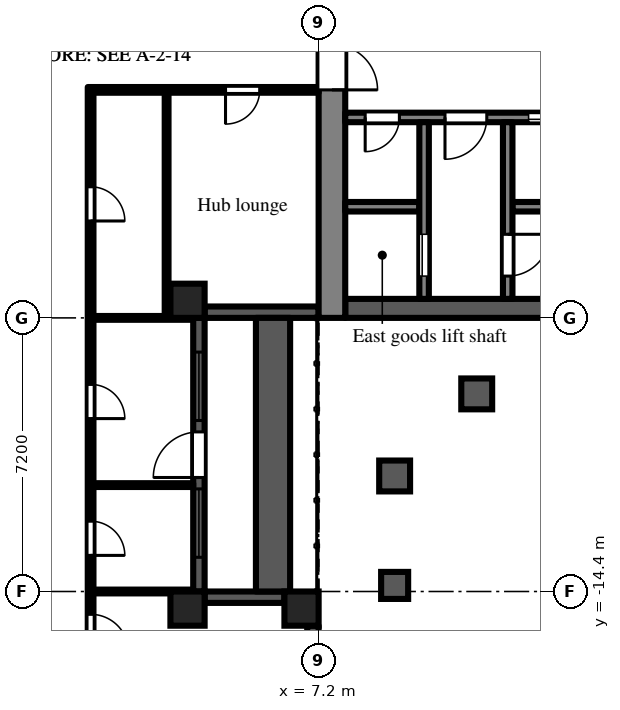
"""IFC4 building model, lengths in metres.
Left out: names, types, materials, properties, quantities, classifications, styles, units other than length and angle.
Written with IfcOpenShell. Run it as: python <this file> out.ifc"""

import sys

from ifc_helpers import new_model, si_unit, direction, frame, frame_2d, origin, origin_2d, place, context, subcontext, project, spatial, rectangle, extrude, element, fill, save


model = new_model("IFC4")
c1 = context("Model", 3, precision=1e-05, world=origin(), true_north=direction((0.0, 1.0)))
c2 = subcontext(c1, "Body", "Model", "MODEL_VIEW")
j1 = project(units=[si_unit("LENGTHUNIT", "METRE"), si_unit("PLANEANGLEUNIT", "RADIAN")], contexts=[c1])
p1 = place(None, origin())
s1 = spatial("IfcSite", under=j1, at=p1, CompositionType="ELEMENT")
p2 = place(p1, origin())
s2 = spatial("IfcBuilding", under=s1, at=p2, CompositionType="ELEMENT")
p3 = place(p2, frame((0.0, 0.0, 84.9)))
s3 = spatial("IfcBuildingStorey", under=s2, at=p3, CompositionType="ELEMENT", Elevation=84.9)
for number, where, z_axis, x_axis in (
    (1, (3.75, -14.85, 0.0), (0.0, 0.0, 1.0), (1.0, 0.0, 0.0)),
    (2, (3.75, -6.75, 0.0), (0.0, 0.0, 1.0), (1.0, 0.0, 0.0)),
    (3, (6.75, -14.85, 0.0), (0.0, 0.0, 1.0), (1.0, 0.0, 0.0)),
):
    element("IfcColumn", number, at=place(p3, frame(where, z_axis=z_axis, x_axis=x_axis)), inside=s3, PredefinedType="COLUMN", context=c2, shape_type="SweptSolid", body=[
        extrude(rectangle(XDim=0.9, YDim=0.9, at=origin_2d()), origin(), (0.0, 0.0, 1.0), 3.0),
    ])
p4 = place(p3, frame((7.05, -17.1, 0.0), z_axis=(0.0, 0.0, 1.0), x_axis=(0.0, 1.0, 0.0)))
e4 = element("IfcWall", 4, at=p4, inside=s3, PredefinedType="SOLIDWALL", context=c2, shape_type="SweptSolid", body=[
    extrude(rectangle(XDim=1.8, YDim=0.3, at=frame_2d((0.9, 0.0))), origin(), (0.0, 0.0, 1.0), 2.1),
])
p5 = place(p4, frame((0.3, 0.0, 0.2)))
e5 = element("IfcOpeningElement", 5, at=p5, cuts=e4, PredefinedType="OPENING", context=c2, shape_type="SweptSolid", body=[
    extrude(rectangle(XDim=1.2, YDim=1.85, at=frame_2d((0.6, 0.925))), frame((0.0, 0.16, 0.0), z_axis=(0.0, -1.0, 0.0), x_axis=(1.0, 0.0, 0.0)), (0.0, 0.0, 1.0), 0.32),
])
p6 = place(p3, frame((6.3, -14.55, 0.0), z_axis=(0.0, 0.0, 1.0), x_axis=(-1.0, 0.0, 0.0)))
e6 = element("IfcWall", 6, at=p6, inside=s3, PredefinedType="SOLIDWALL", context=c2, shape_type="SweptSolid", body=[
    extrude(rectangle(XDim=2.1, YDim=0.3, at=frame_2d((1.05, 0.0))), origin(), (0.0, 0.0, 1.0), 2.1),
])
p7 = place(p3, frame((4.05, -14.4, 0.0), z_axis=(0.0, 0.0, 1.0), x_axis=(0.0, 1.0, 0.0)))
e7 = element("IfcWall", 7, at=p7, inside=s3, PredefinedType="SOLIDWALL", context=c2, shape_type="SweptSolid", body=[
    extrude(rectangle(XDim=7.2, YDim=0.3, at=frame_2d((3.6, 0.0))), origin(), (0.0, 0.0, 1.0), 2.1),
])
p8 = place(p7, frame((3.0, 0.0, 0.0)))
e8 = element("IfcOpeningElement", 8, at=p8, cuts=e7, PredefinedType="OPENING", context=c2, shape_type="SweptSolid", body=[
    extrude(rectangle(XDim=1.2, YDim=2.05, at=frame_2d((0.6, 1.025))), frame((0.0, 0.16, 0.0), z_axis=(0.0, -1.0, 0.0), x_axis=(1.0, 0.0, 0.0)), (0.0, 0.0, 1.0), 0.32),
])
p9 = place(p7, frame((0.9, 0.0, 0.2)))
e9 = element("IfcOpeningElement", 9, at=p9, cuts=e7, PredefinedType="OPENING", context=c2, shape_type="SweptSolid", body=[
    extrude(rectangle(XDim=1.8, YDim=1.85, at=frame_2d((0.9, 0.925))), frame((0.0, 0.16, 0.0), z_axis=(0.0, -1.0, 0.0), x_axis=(1.0, 0.0, 0.0)), (0.0, 0.0, 1.0), 0.32),
])
p10 = place(p7, frame((4.5, 0.0, 0.2)))
e10 = element("IfcOpeningElement", 10, at=p10, cuts=e7, PredefinedType="OPENING", context=c2, shape_type="SweptSolid", body=[
    extrude(rectangle(XDim=1.8, YDim=1.85, at=frame_2d((0.9, 0.925))), frame((0.0, 0.16, 0.0), z_axis=(0.0, -1.0, 0.0), x_axis=(1.0, 0.0, 0.0)), (0.0, 0.0, 1.0), 0.32),
])
p11 = place(p3, frame((4.2, -7.05, 0.0), z_axis=(0.0, 0.0, 1.0), x_axis=(1.0, 0.0, 0.0)))
e11 = element("IfcWall", 11, at=p11, inside=s3, PredefinedType="SOLIDWALL", context=c2, shape_type="SweptSolid", body=[
    extrude(rectangle(XDim=3.0, YDim=0.3, at=frame_2d((1.5, 0.0))), origin(), (0.0, 0.0, 1.0), 2.1),
])
p12 = place(p3, frame((6.0, -14.4, 0.0), z_axis=(0.0, 0.0, 1.0), x_axis=(0.0, 1.0, 0.0)))
e12 = element("IfcWall", 12, at=p12, inside=s3, PredefinedType="PARAPET", context=c2, shape_type="SweptSolid", body=[
    extrude(rectangle(XDim=7.2, YDim=0.9, at=frame_2d((3.6, 0.0))), origin(), (0.0, 0.0, 1.0), 0.8),
])
p13 = place(p3, frame((7.55, -7.2, 0.0), z_axis=(0.0, 0.0, 1.0), x_axis=(0.0, 1.0, 0.0)))
e13 = element("IfcWall", 13, at=p13, inside=s3, PredefinedType="SHEAR", context=c2, shape_type="SweptSolid", body=[
    extrude(rectangle(XDim=14.4, YDim=0.7, at=frame_2d((7.2, 0.0))), origin(), (0.0, 0.0, 1.0), 2.575),
])
p14 = place(p13, frame((6.0, 0.0, 0.0)))
e14 = element("IfcOpeningElement", 14, at=p14, cuts=e13, PredefinedType="OPENING", context=c2, shape_type="SweptSolid", body=[
    extrude(rectangle(XDim=2.4, YDim=2.2, at=frame_2d((1.2, 1.1))), frame((0.0, 0.36, 0.0), z_axis=(0.0, -1.0, 0.0), x_axis=(1.0, 0.0, 0.0)), (0.0, 0.0, 1.0), 0.72),
])
p15 = place(p3, frame((7.9, -6.95, 0.0), z_axis=(0.0, 0.0, 1.0), x_axis=(1.0, 0.0, 0.0)))
e15 = element("IfcWall", 15, at=p15, inside=s3, PredefinedType="SHEAR", context=c2, shape_type="SweptSolid", body=[
    extrude(rectangle(XDim=12.95, YDim=0.5, at=frame_2d((6.475, 0.0))), origin(), (0.0, 0.0, 1.0), 2.575),
])
p16 = place(p3, frame((7.9, -1.925, 0.0), z_axis=(0.0, 0.0, 1.0), x_axis=(1.0, 0.0, 0.0)))
e16 = element("IfcWall", 16, at=p16, inside=s3, PredefinedType="SHEAR", context=c2, shape_type="SweptSolid", body=[
    extrude(rectangle(XDim=12.95, YDim=0.25, at=frame_2d((6.475, 0.0))), origin(), (0.0, 0.0, 1.0), 2.575),
])
p17 = place(p16, frame((4.825, 0.0, 0.0)))
e17 = element("IfcOpeningElement", 17, at=p17, cuts=e16, PredefinedType="OPENING", context=c2, shape_type="SweptSolid", body=[
    extrude(rectangle(XDim=1.1, YDim=2.1, at=frame_2d((0.55, 1.05))), frame((0.0, 0.135, 0.0), z_axis=(0.0, -1.0, 0.0), x_axis=(1.0, 0.0, 0.0)), (0.0, 0.0, 1.0), 0.27),
])
p18 = place(p16, frame((7.025, 0.0, 0.0)))
e18 = element("IfcOpeningElement", 18, at=p18, cuts=e16, PredefinedType="OPENING", context=c2, shape_type="SweptSolid", body=[
    extrude(rectangle(XDim=1.1, YDim=2.1, at=frame_2d((0.55, 1.05))), frame((0.0, 0.135, 0.0), z_axis=(0.0, -1.0, 0.0), x_axis=(1.0, 0.0, 0.0)), (0.0, 0.0, 1.0), 0.27),
])
p19 = place(p16, frame((9.225, 0.0, 0.0)))
e19 = element("IfcOpeningElement", 19, at=p19, cuts=e16, PredefinedType="OPENING", context=c2, shape_type="SweptSolid", body=[
    extrude(rectangle(XDim=1.1, YDim=2.1, at=frame_2d((0.55, 1.05))), frame((0.0, 0.135, 0.0), z_axis=(0.0, -1.0, 0.0), x_axis=(1.0, 0.0, 0.0)), (0.0, 0.0, 1.0), 0.27),
])
p20 = place(p16, frame((0.525, 0.0, 0.0)))
e20 = element("IfcOpeningElement", 20, at=p20, cuts=e16, PredefinedType="OPENING", context=c2, shape_type="SweptSolid", body=[
    extrude(rectangle(XDim=0.9, YDim=2.1, at=frame_2d((0.45, 1.05))), frame((0.0, 0.135, 0.0), z_axis=(0.0, -1.0, 0.0), x_axis=(1.0, 0.0, 0.0)), (0.0, 0.0, 1.0), 0.27),
])
p21 = place(p16, frame((2.625, 0.0, 0.0)))
e21 = element("IfcOpeningElement", 21, at=p21, cuts=e16, PredefinedType="OPENING", context=c2, shape_type="SweptSolid", body=[
    extrude(rectangle(XDim=1.1, YDim=2.1, at=frame_2d((0.55, 1.05))), frame((0.0, 0.135, 0.0), z_axis=(0.0, -1.0, 0.0), x_axis=(1.0, 0.0, 0.0)), (0.0, 0.0, 1.0), 0.27),
])
p22 = place(p3, frame((7.9, -4.275, 0.0), z_axis=(0.0, 0.0, 1.0), x_axis=(1.0, 0.0, 0.0)))
e22 = element("IfcWall", 22, at=p22, inside=s3, PredefinedType="SHEAR", context=c2, shape_type="SweptSolid", body=[
    extrude(rectangle(XDim=1.95, YDim=0.25, at=frame_2d((0.975, 0.0))), origin(), (0.0, 0.0, 1.0), 2.575),
])
p23 = place(p3, frame((12.3, -4.275, 0.0), z_axis=(0.0, 0.0, 1.0), x_axis=(1.0, 0.0, 0.0)))
e23 = element("IfcWall", 23, at=p23, inside=s3, PredefinedType="SHEAR", context=c2, shape_type="SweptSolid", body=[
    extrude(rectangle(XDim=8.55, YDim=0.25, at=frame_2d((4.275, 0.0))), origin(), (0.0, 0.0, 1.0), 2.575),
])
p24 = place(p3, frame((9.975, -2.05, 0.0), z_axis=(0.0, 0.0, 1.0), x_axis=(0.0, -1.0, 0.0)))
e24 = element("IfcWall", 24, at=p24, inside=s3, PredefinedType="SHEAR", context=c2, shape_type="SweptSolid", body=[
    extrude(rectangle(XDim=4.65, YDim=0.25, at=frame_2d((2.325, 0.0))), origin(), (0.0, 0.0, 1.0), 2.575),
])
p25 = place(p24, frame((2.95, 0.0, 0.0)))
e25 = element("IfcOpeningElement", 25, at=p25, cuts=e24, PredefinedType="OPENING", context=c2, shape_type="SweptSolid", body=[
    extrude(rectangle(XDim=1.1, YDim=2.1, at=frame_2d((0.55, 1.05))), frame((0.0, 0.135, 0.0), z_axis=(0.0, -1.0, 0.0), x_axis=(1.0, 0.0, 0.0)), (0.0, 0.0, 1.0), 0.27),
])
p26 = place(p3, frame((12.175, -2.05, 0.0), z_axis=(0.0, 0.0, 1.0), x_axis=(0.0, -1.0, 0.0)))
e26 = element("IfcWall", 26, at=p26, inside=s3, PredefinedType="SHEAR", context=c2, shape_type="SweptSolid", body=[
    extrude(rectangle(XDim=4.65, YDim=0.25, at=frame_2d((2.325, 0.0))), origin(), (0.0, 0.0, 1.0), 2.575),
])
p27 = place(p26, frame((2.95, 0.0, 0.0)))
e27 = element("IfcOpeningElement", 27, at=p27, cuts=e26, PredefinedType="OPENING", context=c2, shape_type="SweptSolid", body=[
    extrude(rectangle(XDim=1.1, YDim=2.1, at=frame_2d((0.55, 1.05))), frame((0.0, 0.135, 0.0), z_axis=(0.0, -1.0, 0.0), x_axis=(1.0, 0.0, 0.0)), (0.0, 0.0, 1.0), 0.27),
])
p28 = place(p3, frame((1.2, -36.5, 0.0), z_axis=(0.0, 0.0, 1.0), x_axis=(0.0, 1.0, 0.0)))
e28 = element("IfcWall", 28, at=p28, inside=s3, PredefinedType="PARTITIONING", context=c2, shape_type="SweptSolid", body=[
    extrude(rectangle(XDim=35.375, YDim=0.15, at=frame_2d((17.688, 0.0))), origin(), (0.0, 0.0, 1.0), 2.575),
])
p29 = place(p28, frame((31.85, 0.0, 0.0)))
e29 = element("IfcOpeningElement", 29, at=p29, cuts=e28, PredefinedType="OPENING", context=c2, shape_type="SweptSolid", body=[
    extrude(rectangle(XDim=0.9, YDim=2.1, at=frame_2d((0.45, 1.05))), frame((0.0, 0.085, 0.0), z_axis=(0.0, -1.0, 0.0), x_axis=(1.0, 0.0, 0.0)), (0.0, 0.0, 1.0), 0.17),
])
p30 = place(p28, frame((23.05, 0.0, 0.0)))
e30 = element("IfcOpeningElement", 30, at=p30, cuts=e28, PredefinedType="OPENING", context=c2, shape_type="SweptSolid", body=[
    extrude(rectangle(XDim=0.9, YDim=2.1, at=frame_2d((0.45, 1.05))), frame((0.0, 0.085, 0.0), z_axis=(0.0, -1.0, 0.0), x_axis=(1.0, 0.0, 0.0)), (0.0, 0.0, 1.0), 0.17),
])
p31 = place(p28, frame((26.65, 0.0, 0.0)))
e31 = element("IfcOpeningElement", 31, at=p31, cuts=e28, PredefinedType="OPENING", context=c2, shape_type="SweptSolid", body=[
    extrude(rectangle(XDim=0.9, YDim=2.1, at=frame_2d((0.45, 1.05))), frame((0.0, 0.085, 0.0), z_axis=(0.0, -1.0, 0.0), x_axis=(1.0, 0.0, 0.0)), (0.0, 0.0, 1.0), 0.17),
])
p32 = place(p28, frame((20.5, 0.0, 0.0)))
e32 = element("IfcOpeningElement", 32, at=p32, cuts=e28, PredefinedType="OPENING", context=c2, shape_type="SweptSolid", body=[
    extrude(rectangle(XDim=1.0, YDim=2.1, at=frame_2d((0.5, 1.05))), frame((0.0, 0.085, 0.0), z_axis=(0.0, -1.0, 0.0), x_axis=(1.0, 0.0, 0.0)), (0.0, 0.0, 1.0), 0.17),
])
p33 = place(p28, frame((1.55, 0.0, 0.0)))
e33 = element("IfcOpeningElement", 33, at=p33, cuts=e28, PredefinedType="OPENING", context=c2, shape_type="SweptSolid", body=[
    extrude(rectangle(XDim=1.0, YDim=2.1, at=frame_2d((0.5, 1.05))), frame((0.0, 0.085, 0.0), z_axis=(0.0, -1.0, 0.0), x_axis=(1.0, 0.0, 0.0)), (0.0, 0.0, 1.0), 0.17),
])
for number, where, z_axis, x_axis in (
    (34, (1.275, -14.4, 0.0), (0.0, 0.0, 1.0), (1.0, 0.0, 0.0)),
    (35, (1.275, -11.6, 0.0), (0.0, 0.0, 1.0), (1.0, 0.0, 0.0)),
    (36, (1.275, -7.2, 0.0), (0.0, 0.0, 1.0), (1.0, 0.0, 0.0)),
):
    element("IfcWall", number, at=place(p3, frame(where, z_axis=z_axis, x_axis=x_axis)), inside=s3, PredefinedType="PARTITIONING", context=c2, shape_type="SweptSolid", body=[
        extrude(rectangle(XDim=2.625, YDim=0.1, at=frame_2d((1.312, 0.0))), origin(), (0.0, 0.0, 1.0), 2.575),
    ])
p34 = place(p3, frame((1.275, -1.2, 0.0), z_axis=(0.0, 0.0, 1.0), x_axis=(1.0, 0.0, 0.0)))
e37 = element("IfcWall", 37, at=p34, inside=s3, PredefinedType="PARTITIONING", context=c2, shape_type="SweptSolid", body=[
    extrude(rectangle(XDim=5.925, YDim=0.15, at=frame_2d((2.962, 0.0))), origin(), (0.0, 0.0, 1.0), 2.575),
])
p35 = place(p34, frame((3.475, 0.0, 0.0)))
e38 = element("IfcOpeningElement", 38, at=p35, cuts=e37, PredefinedType="OPENING", context=c2, shape_type="SweptSolid", body=[
    extrude(rectangle(XDim=0.9, YDim=2.1, at=frame_2d((0.45, 1.05))), frame((0.0, 0.085, 0.0), z_axis=(0.0, -1.0, 0.0), x_axis=(1.0, 0.0, 0.0)), (0.0, 0.0, 1.0), 0.17),
])
p36 = place(p3, frame((3.2, -7.15, 0.0), z_axis=(0.0, 0.0, 1.0), x_axis=(0.0, 1.0, 0.0)))
e39 = element("IfcWall", 39, at=p36, inside=s3, PredefinedType="PARTITIONING", context=c2, shape_type="SweptSolid", body=[
    extrude(rectangle(XDim=5.875, YDim=0.1, at=frame_2d((2.938, 0.0))), origin(), (0.0, 0.0, 1.0), 2.575),
])
p37 = place(p8, origin())
e40 = element("IfcDoor", 40, at=p37, inside=s3, OperationType="SINGLE_SWING_LEFT", PredefinedType="DOOR", context=c2, shape_type="SweptSolid", body=[
    extrude(rectangle(XDim=1.2, YDim=2.05, at=frame_2d((0.6, 1.025))), frame((0.0, 0.025, 0.0), z_axis=(0.0, -1.0, 0.0), x_axis=(1.0, 0.0, 0.0)), (0.0, 0.0, 1.0), 0.05),
])
fill(e8, e40)
p38 = place(p9, origin())
e41 = element("IfcWindow", 41, at=p38, inside=s3, PartitioningType="SINGLE_PANEL", PredefinedType="WINDOW", context=c2, shape_type="SweptSolid", body=[
    extrude(rectangle(XDim=1.8, YDim=1.85, at=frame_2d((0.9, 0.925))), frame((0.0, 0.03, 0.0), z_axis=(0.0, -1.0, 0.0), x_axis=(1.0, 0.0, 0.0)), (0.0, 0.0, 1.0), 0.06),
])
fill(e9, e41)
p39 = place(p10, origin())
e42 = element("IfcWindow", 42, at=p39, inside=s3, PartitioningType="SINGLE_PANEL", PredefinedType="WINDOW", context=c2, shape_type="SweptSolid", body=[
    extrude(rectangle(XDim=1.8, YDim=1.85, at=frame_2d((0.9, 0.925))), frame((0.0, 0.03, 0.0), z_axis=(0.0, -1.0, 0.0), x_axis=(1.0, 0.0, 0.0)), (0.0, 0.0, 1.0), 0.06),
])
fill(e10, e42)
p40 = place(p17, origin())
e43 = element("IfcDoor", 43, at=p40, inside=s3, OperationType="SLIDING_TO_LEFT", PredefinedType="DOOR", context=c2, shape_type="SweptSolid", body=[
    extrude(rectangle(XDim=1.1, YDim=2.1, at=frame_2d((0.55, 1.05))), frame((0.0, 0.025, 0.0), z_axis=(0.0, -1.0, 0.0), x_axis=(1.0, 0.0, 0.0)), (0.0, 0.0, 1.0), 0.05),
])
fill(e17, e43)
p41 = place(p25, origin())
e44 = element("IfcDoor", 44, at=p41, inside=s3, OperationType="SLIDING_TO_LEFT", PredefinedType="DOOR", context=c2, shape_type="SweptSolid", body=[
    extrude(rectangle(XDim=1.1, YDim=2.1, at=frame_2d((0.55, 1.05))), frame((0.0, 0.025, 0.0), z_axis=(0.0, -1.0, 0.0), x_axis=(1.0, 0.0, 0.0)), (0.0, 0.0, 1.0), 0.05),
])
fill(e25, e44)
p42 = place(p27, origin())
e45 = element("IfcDoor", 45, at=p42, inside=s3, OperationType="SINGLE_SWING_LEFT", PredefinedType="DOOR", context=c2, shape_type="SweptSolid", body=[
    extrude(rectangle(XDim=1.1, YDim=2.1, at=frame_2d((0.55, 1.05))), frame((0.0, 0.025, 0.0), z_axis=(0.0, -1.0, 0.0), x_axis=(1.0, 0.0, 0.0)), (0.0, 0.0, 1.0), 0.05),
])
fill(e27, e45)
p43 = place(p20, frame((0.9, 0.0, 0.0), z_axis=(0.0, 0.0, 1.0), x_axis=(-1.0, 0.0, 0.0)))
e46 = element("IfcDoor", 46, at=p43, inside=s3, OperationType="SINGLE_SWING_RIGHT", PredefinedType="DOOR", context=c2, shape_type="SweptSolid", body=[
    extrude(rectangle(XDim=0.9, YDim=2.1, at=frame_2d((0.45, 1.05))), frame((0.0, 0.025, 0.0), z_axis=(0.0, -1.0, 0.0), x_axis=(1.0, 0.0, 0.0)), (0.0, 0.0, 1.0), 0.05),
])
fill(e20, e46)
p44 = place(p21, frame((1.1, 0.0, 0.0), z_axis=(0.0, 0.0, 1.0), x_axis=(-1.0, 0.0, 0.0)))
e47 = element("IfcDoor", 47, at=p44, inside=s3, OperationType="SINGLE_SWING_RIGHT", PredefinedType="DOOR", context=c2, shape_type="SweptSolid", body=[
    extrude(rectangle(XDim=1.1, YDim=2.1, at=frame_2d((0.55, 1.05))), frame((0.0, 0.025, 0.0), z_axis=(0.0, -1.0, 0.0), x_axis=(1.0, 0.0, 0.0)), (0.0, 0.0, 1.0), 0.05),
])
fill(e21, e47)
p45 = place(p14, frame((2.4, 0.0, 0.0), z_axis=(0.0, 0.0, 1.0), x_axis=(-1.0, 0.0, 0.0)))
e48 = element("IfcDoor", 48, at=p45, inside=s3, OperationType="DOUBLE_DOOR_DOUBLE_SWING", PredefinedType="DOOR", context=c2, shape_type="SweptSolid", body=[
    extrude(rectangle(XDim=2.4, YDim=2.2, at=frame_2d((1.2, 1.1))), frame((0.0, 0.025, 0.0), z_axis=(0.0, -1.0, 0.0), x_axis=(1.0, 0.0, 0.0)), (0.0, 0.0, 1.0), 0.05),
])
fill(e14, e48)
p46 = place(p29, frame((0.9, 0.0, 0.0), z_axis=(0.0, 0.0, 1.0), x_axis=(-1.0, 0.0, 0.0)))
e49 = element("IfcDoor", 49, at=p46, inside=s3, OperationType="SINGLE_SWING_RIGHT", PredefinedType="DOOR", context=c2, shape_type="SweptSolid", body=[
    extrude(rectangle(XDim=0.9, YDim=2.1, at=frame_2d((0.45, 1.05))), frame((0.0, 0.025, 0.0), z_axis=(0.0, -1.0, 0.0), x_axis=(1.0, 0.0, 0.0)), (0.0, 0.0, 1.0), 0.05),
])
fill(e29, e49)
p47 = place(p35, frame((0.9, 0.0, 0.0), z_axis=(0.0, 0.0, 1.0), x_axis=(-1.0, 0.0, 0.0)))
e50 = element("IfcDoor", 50, at=p47, inside=s3, OperationType="SINGLE_SWING_RIGHT", PredefinedType="DOOR", context=c2, shape_type="SweptSolid", body=[
    extrude(rectangle(XDim=0.9, YDim=2.1, at=frame_2d((0.45, 1.05))), frame((0.0, 0.025, 0.0), z_axis=(0.0, -1.0, 0.0), x_axis=(1.0, 0.0, 0.0)), (0.0, 0.0, 1.0), 0.05),
])
fill(e38, e50)
p48 = place(p30, frame((0.9, 0.0, 0.0), z_axis=(0.0, 0.0, 1.0), x_axis=(-1.0, 0.0, 0.0)))
e51 = element("IfcDoor", 51, at=p48, inside=s3, OperationType="SINGLE_SWING_RIGHT", PredefinedType="DOOR", context=c2, shape_type="SweptSolid", body=[
    extrude(rectangle(XDim=0.9, YDim=2.1, at=frame_2d((0.45, 1.05))), frame((0.0, 0.025, 0.0), z_axis=(0.0, -1.0, 0.0), x_axis=(1.0, 0.0, 0.0)), (0.0, 0.0, 1.0), 0.05),
])
fill(e30, e51)
p49 = place(p31, frame((0.9, 0.0, 0.0), z_axis=(0.0, 0.0, 1.0), x_axis=(-1.0, 0.0, 0.0)))
e52 = element("IfcDoor", 52, at=p49, inside=s3, OperationType="SINGLE_SWING_RIGHT", PredefinedType="DOOR", context=c2, shape_type="SweptSolid", body=[
    extrude(rectangle(XDim=0.9, YDim=2.1, at=frame_2d((0.45, 1.05))), frame((0.0, 0.025, 0.0), z_axis=(0.0, -1.0, 0.0), x_axis=(1.0, 0.0, 0.0)), (0.0, 0.0, 1.0), 0.05),
])
fill(e31, e52)
p50 = place(p32, frame((1.0, 0.0, 0.0), z_axis=(0.0, 0.0, 1.0), x_axis=(-1.0, 0.0, 0.0)))
e53 = element("IfcDoor", 53, at=p50, inside=s3, OperationType="SINGLE_SWING_RIGHT", PredefinedType="DOOR", context=c2, shape_type="SweptSolid", body=[
    extrude(rectangle(XDim=1.0, YDim=2.1, at=frame_2d((0.5, 1.05))), frame((0.0, 0.025, 0.0), z_axis=(0.0, -1.0, 0.0), x_axis=(1.0, 0.0, 0.0)), (0.0, 0.0, 1.0), 0.05),
])
fill(e32, e53)
save(model, sys.argv[1])
